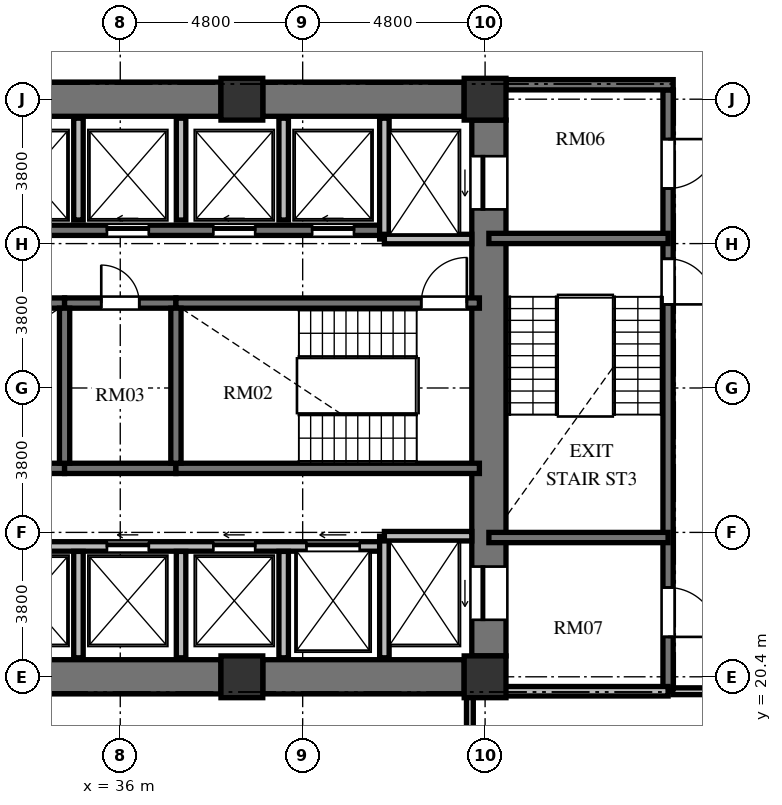
"""IFC4 building model, lengths in metres.
Left out: names, types, materials, properties, quantities, classifications, styles, units other than length and angle.
Written with IfcOpenShell. Run it as: python <this file> out.ifc"""

import sys

from ifc_helpers import new_model, si_unit, direction, frame, frame_2d, origin, origin_2d, place, context, subcontext, project, spatial, rectangle, extrude, element, fill, save


model = new_model("IFC4")
c1 = context("Model", 3, precision=1e-05, world=origin(), true_north=direction((0.0, 1.0)))
c2 = subcontext(c1, "Body", "Model", "MODEL_VIEW")
j1 = project(units=[si_unit("LENGTHUNIT", "METRE"), si_unit("PLANEANGLEUNIT", "RADIAN")], contexts=[c1])
p1 = place(None, origin())
s1 = spatial("IfcSite", under=j1, at=p1, CompositionType="ELEMENT")
p2 = place(p1, origin())
s2 = spatial("IfcBuilding", under=s1, at=p2, CompositionType="ELEMENT")
p3 = place(p2, frame((0.0, 0.0, 47.088)))
s3 = spatial("IfcBuildingStorey", under=s2, at=p3, CompositionType="ELEMENT", Elevation=47.088)
for number, where, z_axis, x_axis in (
    (1, (39.2, 20.4, 0.0), (0.0, 0.0, 1.0), (1.0, 0.0, 0.0)),
    (2, (45.6, 20.4, 0.0), (0.0, 0.0, 1.0), (1.0, 0.0, 0.0)),
    (3, (45.6, 35.6, 0.0), (0.0, 0.0, 1.0), (1.0, 0.0, 0.0)),
    (4, (39.2, 35.6, 0.0), (0.0, 0.0, 1.0), (1.0, 0.0, 0.0)),
):
    element("IfcColumn", number, at=place(p3, frame(where, z_axis=z_axis, x_axis=x_axis)), inside=s3, PredefinedType="COLUMN", context=c2, shape_type="SweptSolid", body=[
        extrude(rectangle(XDim=1.1, YDim=1.1, at=origin_2d()), origin(), (0.0, 0.0, 1.0), 3.648),
    ])
p4 = place(p3, frame((45.7, 20.95, 0.0), z_axis=(0.0, 0.0, 1.0), x_axis=(0.0, 1.0, 0.0)))
e5 = element("IfcWall", 5, at=p4, inside=s3, PredefinedType="SHEAR", context=c2, shape_type="SweptSolid", body=[
    extrude(rectangle(XDim=14.1, YDim=0.9, at=frame_2d((7.05, 0.0))), origin(), (0.0, 0.0, 1.0), 3.648),
])
p5 = place(p4, frame((11.75, 0.0, 0.0)))
e6 = element("IfcOpeningElement", 6, at=p5, cuts=e5, PredefinedType="OPENING", context=c2, shape_type="SweptSolid", body=[
    extrude(rectangle(XDim=1.4, YDim=2.3, at=frame_2d((0.7, 1.15))), frame((0.0, 0.46, 0.0), z_axis=(0.0, -1.0, 0.0), x_axis=(1.0, 0.0, 0.0)), (0.0, 0.0, 1.0), 0.92),
])
p6 = place(p4, frame((0.95, 0.0, 0.0)))
e7 = element("IfcOpeningElement", 7, at=p6, cuts=e5, PredefinedType="OPENING", context=c2, shape_type="SweptSolid", body=[
    extrude(rectangle(XDim=1.4, YDim=2.3, at=frame_2d((0.7, 1.15))), frame((0.0, 0.46, 0.0), z_axis=(0.0, -1.0, 0.0), x_axis=(1.0, 0.0, 0.0)), (0.0, 0.0, 1.0), 0.92),
])
for number, where, z_axis, x_axis in (
    (8, (33.35, 20.4, 0.0), (0.0, 0.0, 1.0), (1.0, 0.0, 0.0)),
    (9, (33.35, 35.6, 0.0), (0.0, 0.0, 1.0), (1.0, 0.0, 0.0)),
):
    element("IfcWall", number, at=place(p3, frame(where, z_axis=z_axis, x_axis=x_axis)), inside=s3, PredefinedType="SHEAR", context=c2, shape_type="SweptSolid", body=[
        extrude(rectangle(XDim=5.3, YDim=0.9, at=frame_2d((2.65, 0.0))), origin(), (0.0, 0.0, 1.0), 3.648),
    ])
for number, where, z_axis, x_axis in (
    (10, (39.75, 20.4, 0.0), (0.0, 0.0, 1.0), (1.0, 0.0, 0.0)),
    (11, (39.75, 35.6, 0.0), (0.0, 0.0, 1.0), (1.0, 0.0, 0.0)),
):
    element("IfcWall", number, at=place(p3, frame(where, z_axis=z_axis, x_axis=x_axis)), inside=s3, PredefinedType="SHEAR", context=c2, shape_type="SweptSolid", body=[
        extrude(rectangle(XDim=5.3, YDim=0.9, at=frame_2d((2.65, 0.0))), origin(), (0.0, 0.0, 1.0), 3.648),
    ])
p7 = place(p3, frame((26.55, 30.235, 0.0), z_axis=(0.0, 0.0, 1.0), x_axis=(1.0, 0.0, 0.0)))
e12 = element("IfcWall", 12, at=p7, inside=s3, PredefinedType="SHEAR", context=c2, shape_type="SweptSolid", body=[
    extrude(rectangle(XDim=7.985, YDim=0.27, at=frame_2d((3.992, 0.0))), origin(), (0.0, 0.0, 1.0), 3.648),
])
p8 = place(p3, frame((34.535, 30.235, 0.0), z_axis=(0.0, 0.0, 1.0), x_axis=(1.0, 0.0, 0.0)))
e13 = element("IfcWall", 13, at=p8, inside=s3, PredefinedType="SHEAR", context=c2, shape_type="SweptSolid", body=[
    extrude(rectangle(XDim=2.93, YDim=0.27, at=frame_2d((1.465, 0.0))), origin(), (0.0, 0.0, 1.0), 3.648),
])
p9 = place(p8, frame((0.965, 0.0, 0.0)))
e14 = element("IfcOpeningElement", 14, at=p9, cuts=e13, PredefinedType="OPENING", context=c2, shape_type="SweptSolid", body=[
    extrude(rectangle(XDim=1.0, YDim=2.1, at=frame_2d((0.5, 1.05))), frame((0.0, 0.145, 0.0), z_axis=(0.0, -1.0, 0.0), x_axis=(1.0, 0.0, 0.0)), (0.0, 0.0, 1.0), 0.29),
])
p10 = place(p3, frame((37.465, 30.235, 0.0), z_axis=(0.0, 0.0, 1.0), x_axis=(1.0, 0.0, 0.0)))
e15 = element("IfcWall", 15, at=p10, inside=s3, PredefinedType="SHEAR", context=c2, shape_type="SweptSolid", body=[
    extrude(rectangle(XDim=7.985, YDim=0.27, at=frame_2d((3.992, 0.0))), origin(), (0.0, 0.0, 1.0), 3.648),
])
p11 = place(p10, frame((6.455, 0.0, 0.0)))
e16 = element("IfcOpeningElement", 16, at=p11, cuts=e15, PredefinedType="OPENING", context=c2, shape_type="SweptSolid", body=[
    extrude(rectangle(XDim=1.2, YDim=2.15, at=frame_2d((0.6, 1.075))), frame((0.0, 0.145, 0.0), z_axis=(0.0, -1.0, 0.0), x_axis=(1.0, 0.0, 0.0)), (0.0, 0.0, 1.0), 0.29),
])
p12 = place(p3, frame((26.55, 25.885, 0.0), z_axis=(0.0, 0.0, 1.0), x_axis=(1.0, 0.0, 0.0)))
e17 = element("IfcWall", 17, at=p12, inside=s3, PredefinedType="SHEAR", context=c2, shape_type="SweptSolid", body=[
    extrude(rectangle(XDim=7.985, YDim=0.27, at=frame_2d((3.992, 0.0))), origin(), (0.0, 0.0, 1.0), 3.648),
])
p13 = place(p3, frame((34.535, 25.885, 0.0), z_axis=(0.0, 0.0, 1.0), x_axis=(1.0, 0.0, 0.0)))
e18 = element("IfcWall", 18, at=p13, inside=s3, PredefinedType="SHEAR", context=c2, shape_type="SweptSolid", body=[
    extrude(rectangle(XDim=2.93, YDim=0.27, at=frame_2d((1.465, 0.0))), origin(), (0.0, 0.0, 1.0), 3.648),
])
p14 = place(p3, frame((37.465, 25.885, 0.0), z_axis=(0.0, 0.0, 1.0), x_axis=(1.0, 0.0, 0.0)))
e19 = element("IfcWall", 19, at=p14, inside=s3, PredefinedType="SHEAR", context=c2, shape_type="SweptSolid", body=[
    extrude(rectangle(XDim=7.985, YDim=0.27, at=frame_2d((3.992, 0.0))), origin(), (0.0, 0.0, 1.0), 3.648),
])
for number, where, z_axis, x_axis in (
    (20, (34.535, 26.02, 0.0), (0.0, 0.0, 1.0), (0.0, 1.0, 0.0)),
    (21, (37.465, 26.02, 0.0), (0.0, 0.0, 1.0), (0.0, 1.0, 0.0)),
):
    element("IfcWall", number, at=place(p3, frame(where, z_axis=z_axis, x_axis=x_axis)), inside=s3, PredefinedType="SHEAR", context=c2, shape_type="SweptSolid", body=[
        extrude(rectangle(XDim=4.08, YDim=0.27, at=frame_2d((2.04, 0.0))), origin(), (0.0, 0.0, 1.0), 3.648),
    ])
p15 = place(p3, frame((26.55, 32.15, 0.0), z_axis=(0.0, 0.0, 1.0), x_axis=(1.0, 0.0, 0.0)))
e22 = element("IfcWall", 22, at=p15, inside=s3, PredefinedType="SHEAR", context=c2, shape_type="SweptSolid", body=[
    extrude(rectangle(XDim=16.4, YDim=0.27, at=frame_2d((8.2, 0.0))), origin(), (0.0, 0.0, 1.0), 3.648),
])
p16 = place(p15, frame((1.1, 0.0, 0.0)))
e23 = element("IfcOpeningElement", 23, at=p16, cuts=e22, PredefinedType="OPENING", context=c2, shape_type="SweptSolid", body=[
    extrude(rectangle(XDim=1.1, YDim=2.2, at=frame_2d((0.55, 1.1))), frame((0.0, 0.145, 0.0), z_axis=(0.0, -1.0, 0.0), x_axis=(1.0, 0.0, 0.0)), (0.0, 0.0, 1.0), 0.29),
])
p17 = place(p15, frame((3.7, 0.0, 0.0)))
e24 = element("IfcOpeningElement", 24, at=p17, cuts=e22, PredefinedType="OPENING", context=c2, shape_type="SweptSolid", body=[
    extrude(rectangle(XDim=1.1, YDim=2.2, at=frame_2d((0.55, 1.1))), frame((0.0, 0.145, 0.0), z_axis=(0.0, -1.0, 0.0), x_axis=(1.0, 0.0, 0.0)), (0.0, 0.0, 1.0), 0.29),
])
p18 = place(p15, frame((6.5, 0.0, 0.0)))
e25 = element("IfcOpeningElement", 25, at=p18, cuts=e22, PredefinedType="OPENING", context=c2, shape_type="SweptSolid", body=[
    extrude(rectangle(XDim=1.1, YDim=2.2, at=frame_2d((0.55, 1.1))), frame((0.0, 0.145, 0.0), z_axis=(0.0, -1.0, 0.0), x_axis=(1.0, 0.0, 0.0)), (0.0, 0.0, 1.0), 0.29),
])
p19 = place(p15, frame((9.1, 0.0, 0.0)))
e26 = element("IfcOpeningElement", 26, at=p19, cuts=e22, PredefinedType="OPENING", context=c2, shape_type="SweptSolid", body=[
    extrude(rectangle(XDim=1.1, YDim=2.2, at=frame_2d((0.55, 1.1))), frame((0.0, 0.145, 0.0), z_axis=(0.0, -1.0, 0.0), x_axis=(1.0, 0.0, 0.0)), (0.0, 0.0, 1.0), 0.29),
])
p20 = place(p15, frame((11.9, 0.0, 0.0)))
e27 = element("IfcOpeningElement", 27, at=p20, cuts=e22, PredefinedType="OPENING", context=c2, shape_type="SweptSolid", body=[
    extrude(rectangle(XDim=1.1, YDim=2.2, at=frame_2d((0.55, 1.1))), frame((0.0, 0.145, 0.0), z_axis=(0.0, -1.0, 0.0), x_axis=(1.0, 0.0, 0.0)), (0.0, 0.0, 1.0), 0.29),
])
p21 = place(p15, frame((14.5, 0.0, 0.0)))
e28 = element("IfcOpeningElement", 28, at=p21, cuts=e22, PredefinedType="OPENING", context=c2, shape_type="SweptSolid", body=[
    extrude(rectangle(XDim=1.1, YDim=2.2, at=frame_2d((0.55, 1.1))), frame((0.0, 0.145, 0.0), z_axis=(0.0, -1.0, 0.0), x_axis=(1.0, 0.0, 0.0)), (0.0, 0.0, 1.0), 0.29),
])
p22 = place(p3, frame((26.75, 23.83, 0.0), z_axis=(0.0, 0.0, 1.0), x_axis=(1.0, 0.0, 0.0)))
e29 = element("IfcWall", 29, at=p22, inside=s3, PredefinedType="SOLIDWALL", context=c2, shape_type="SweptSolid", body=[
    extrude(rectangle(XDim=16.2, YDim=0.25, at=frame_2d((8.1, 0.0))), origin(), (0.0, 0.0, 1.0), 3.428),
])
p23 = place(p22, frame((0.9, 0.0, 0.0)))
e30 = element("IfcOpeningElement", 30, at=p23, cuts=e29, PredefinedType="OPENING", context=c2, shape_type="SweptSolid", body=[
    extrude(rectangle(XDim=1.1, YDim=2.2, at=frame_2d((0.55, 1.1))), frame((0.0, 0.135, 0.0), z_axis=(0.0, -1.0, 0.0), x_axis=(1.0, 0.0, 0.0)), (0.0, 0.0, 1.0), 0.27),
])
p24 = place(p22, frame((3.5, 0.0, 0.0)))
e31 = element("IfcOpeningElement", 31, at=p24, cuts=e29, PredefinedType="OPENING", context=c2, shape_type="SweptSolid", body=[
    extrude(rectangle(XDim=1.1, YDim=2.2, at=frame_2d((0.55, 1.1))), frame((0.0, 0.135, 0.0), z_axis=(0.0, -1.0, 0.0), x_axis=(1.0, 0.0, 0.0)), (0.0, 0.0, 1.0), 0.27),
])
p25 = place(p22, frame((6.3, 0.0, 0.0)))
e32 = element("IfcOpeningElement", 32, at=p25, cuts=e29, PredefinedType="OPENING", context=c2, shape_type="SweptSolid", body=[
    extrude(rectangle(XDim=1.1, YDim=2.2, at=frame_2d((0.55, 1.1))), frame((0.0, 0.135, 0.0), z_axis=(0.0, -1.0, 0.0), x_axis=(1.0, 0.0, 0.0)), (0.0, 0.0, 1.0), 0.27),
])
p26 = place(p22, frame((8.9, 0.0, 0.0)))
e33 = element("IfcOpeningElement", 33, at=p26, cuts=e29, PredefinedType="OPENING", context=c2, shape_type="SweptSolid", body=[
    extrude(rectangle(XDim=1.1, YDim=2.2, at=frame_2d((0.55, 1.1))), frame((0.0, 0.135, 0.0), z_axis=(0.0, -1.0, 0.0), x_axis=(1.0, 0.0, 0.0)), (0.0, 0.0, 1.0), 0.27),
])
p27 = place(p22, frame((11.7, 0.0, 0.0)))
e34 = element("IfcOpeningElement", 34, at=p27, cuts=e29, PredefinedType="OPENING", context=c2, shape_type="SweptSolid", body=[
    extrude(rectangle(XDim=1.1, YDim=2.2, at=frame_2d((0.55, 1.1))), frame((0.0, 0.135, 0.0), z_axis=(0.0, -1.0, 0.0), x_axis=(1.0, 0.0, 0.0)), (0.0, 0.0, 1.0), 0.27),
])
p28 = place(p22, frame((14.15, 0.0, 0.0)))
e35 = element("IfcOpeningElement", 35, at=p28, cuts=e29, PredefinedType="OPENING", context=c2, shape_type="SweptSolid", body=[
    extrude(rectangle(XDim=1.4, YDim=2.3, at=frame_2d((0.7, 1.15))), frame((0.0, 0.135, 0.0), z_axis=(0.0, -1.0, 0.0), x_axis=(1.0, 0.0, 0.0)), (0.0, 0.0, 1.0), 0.27),
])
p29 = place(p3, frame((42.95, 31.92, 0.0), z_axis=(0.0, 0.0, 1.0), x_axis=(0.0, 1.0, 0.0)))
e36 = element("IfcWall", 36, at=p29, inside=s3, PredefinedType="SOLIDWALL", context=c2, shape_type="SweptSolid", body=[
    extrude(rectangle(XDim=3.18, YDim=0.25, at=frame_2d((1.59, 0.0))), origin(), (0.0, 0.0, 1.0), 3.428),
])
p30 = place(p3, frame((42.95, 31.92, 0.0), z_axis=(0.0, 0.0, 1.0), x_axis=(1.0, 0.0, 0.0)))
e37 = element("IfcWall", 37, at=p30, inside=s3, PredefinedType="SOLIDWALL", context=c2, shape_type="SweptSolid", body=[
    extrude(rectangle(XDim=2.3, YDim=0.25, at=frame_2d((1.15, 0.0))), origin(), (0.0, 0.0, 1.0), 3.428),
])
p31 = place(p3, frame((42.95, 20.9, 0.0), z_axis=(0.0, 0.0, 1.0), x_axis=(0.0, 1.0, 0.0)))
e38 = element("IfcWall", 38, at=p31, inside=s3, PredefinedType="SOLIDWALL", context=c2, shape_type="SweptSolid", body=[
    extrude(rectangle(XDim=3.2, YDim=0.25, at=frame_2d((1.6, 0.0))), origin(), (0.0, 0.0, 1.0), 3.428),
])
p32 = place(p3, frame((42.95, 24.1, 0.0), z_axis=(0.0, 0.0, 1.0), x_axis=(1.0, 0.0, 0.0)))
e39 = element("IfcWall", 39, at=p32, inside=s3, PredefinedType="SOLIDWALL", context=c2, shape_type="SweptSolid", body=[
    extrude(rectangle(XDim=2.3, YDim=0.25, at=frame_2d((1.15, 0.0))), origin(), (0.0, 0.0, 1.0), 3.428),
])
p33 = place(p3, frame((34.9, 32.42, 0.0), z_axis=(0.0, 0.0, 1.0), x_axis=(0.0, 1.0, 0.0)))
e40 = element("IfcWall", 40, at=p33, inside=s3, PredefinedType="SOLIDWALL", context=c2, shape_type="SweptSolid", body=[
    extrude(rectangle(XDim=2.68, YDim=0.25, at=frame_2d((1.34, 0.0))), origin(), (0.0, 0.0, 1.0), 3.428),
])
p34 = place(p3, frame((34.9, 20.9, 0.0), z_axis=(0.0, 0.0, 1.0), x_axis=(0.0, 1.0, 0.0)))
e41 = element("IfcWall", 41, at=p34, inside=s3, PredefinedType="SOLIDWALL", context=c2, shape_type="SweptSolid", body=[
    extrude(rectangle(XDim=2.8, YDim=0.25, at=frame_2d((1.4, 0.0))), origin(), (0.0, 0.0, 1.0), 3.428),
])
p35 = place(p3, frame((37.6, 32.42, 0.0), z_axis=(0.0, 0.0, 1.0), x_axis=(0.0, 1.0, 0.0)))
e42 = element("IfcWall", 42, at=p35, inside=s3, PredefinedType="SOLIDWALL", context=c2, shape_type="SweptSolid", body=[
    extrude(rectangle(XDim=2.68, YDim=0.25, at=frame_2d((1.34, 0.0))), origin(), (0.0, 0.0, 1.0), 3.428),
])
p36 = place(p3, frame((37.6, 20.9, 0.0), z_axis=(0.0, 0.0, 1.0), x_axis=(0.0, 1.0, 0.0)))
e43 = element("IfcWall", 43, at=p36, inside=s3, PredefinedType="SOLIDWALL", context=c2, shape_type="SweptSolid", body=[
    extrude(rectangle(XDim=2.8, YDim=0.25, at=frame_2d((1.4, 0.0))), origin(), (0.0, 0.0, 1.0), 3.428),
])
p37 = place(p3, frame((40.3, 32.42, 0.0), z_axis=(0.0, 0.0, 1.0), x_axis=(0.0, 1.0, 0.0)))
e44 = element("IfcWall", 44, at=p37, inside=s3, PredefinedType="SOLIDWALL", context=c2, shape_type="SweptSolid", body=[
    extrude(rectangle(XDim=2.68, YDim=0.25, at=frame_2d((1.34, 0.0))), origin(), (0.0, 0.0, 1.0), 3.428),
])
p38 = place(p3, frame((40.3, 20.9, 0.0), z_axis=(0.0, 0.0, 1.0), x_axis=(0.0, 1.0, 0.0)))
e45 = element("IfcWall", 45, at=p38, inside=s3, PredefinedType="SOLIDWALL", context=c2, shape_type="SweptSolid", body=[
    extrude(rectangle(XDim=2.8, YDim=0.25, at=frame_2d((1.4, 0.0))), origin(), (0.0, 0.0, 1.0), 3.428),
])
p39 = place(p3, frame((50.415, 35.845, 0.0), z_axis=(0.0, 0.0, 1.0), x_axis=(0.0, -1.0, 0.0)))
e46 = element("IfcWall", 46, at=p39, inside=s3, PredefinedType="SHEAR", context=c2, shape_type="SweptSolid", body=[
    extrude(rectangle(XDim=15.825, YDim=0.27, at=frame_2d((7.913, 0.0))), origin(), (0.0, 0.0, 1.0), 3.648),
])
p40 = place(p39, frame((4.445, 0.0, 0.0)))
e47 = element("IfcOpeningElement", 47, at=p40, cuts=e46, PredefinedType="OPENING", context=c2, shape_type="SweptSolid", body=[
    extrude(rectangle(XDim=1.2, YDim=2.15, at=frame_2d((0.6, 1.075))), frame((0.0, 0.145, 0.0), z_axis=(0.0, -1.0, 0.0), x_axis=(1.0, 0.0, 0.0)), (0.0, 0.0, 1.0), 0.29),
])
p41 = place(p39, frame((1.295, 0.0, 0.0)))
e48 = element("IfcOpeningElement", 48, at=p41, cuts=e46, PredefinedType="OPENING", context=c2, shape_type="SweptSolid", body=[
    extrude(rectangle(XDim=1.3, YDim=2.2, at=frame_2d((0.65, 1.1))), frame((0.0, 0.145, 0.0), z_axis=(0.0, -1.0, 0.0), x_axis=(1.0, 0.0, 0.0)), (0.0, 0.0, 1.0), 0.29),
])
p42 = place(p39, frame((13.095, 0.0, 0.0)))
e49 = element("IfcOpeningElement", 49, at=p42, cuts=e46, PredefinedType="OPENING", context=c2, shape_type="SweptSolid", body=[
    extrude(rectangle(XDim=1.3, YDim=2.2, at=frame_2d((0.65, 1.1))), frame((0.0, 0.145, 0.0), z_axis=(0.0, -1.0, 0.0), x_axis=(1.0, 0.0, 0.0)), (0.0, 0.0, 1.0), 0.29),
])
p43 = place(p3, frame((46.15, 35.98, 0.0), z_axis=(0.0, 0.0, 1.0), x_axis=(1.0, 0.0, 0.0)))
e50 = element("IfcWall", 50, at=p43, inside=s3, PredefinedType="SHEAR", context=c2, shape_type="SweptSolid", body=[
    extrude(rectangle(XDim=4.4, YDim=0.27, at=frame_2d((2.2, 0.0))), origin(), (0.0, 0.0, 1.0), 3.648),
])
for number, where, z_axis, x_axis in (
    (51, (45.7, 31.935, 0.0), (0.0, 0.0, 1.0), (1.0, 0.0, 0.0)),
    (52, (45.7, 24.065, 0.0), (0.0, 0.0, 1.0), (1.0, 0.0, 0.0)),
):
    element("IfcWall", number, at=place(p3, frame(where, z_axis=z_axis, x_axis=x_axis)), inside=s3, PredefinedType="SHEAR", context=c2, shape_type="SweptSolid", body=[
        extrude(rectangle(XDim=4.715, YDim=0.27, at=frame_2d((2.357, 0.0))), origin(), (0.0, 0.0, 1.0), 3.648),
    ])
p44 = place(p3, frame((45.7, 20.02, 0.0), z_axis=(0.0, 0.0, 1.0), x_axis=(1.0, 0.0, 0.0)))
e53 = element("IfcWall", 53, at=p44, inside=s3, PredefinedType="SOLIDWALL", context=c2, shape_type="SweptSolid", body=[
    extrude(rectangle(XDim=4.715, YDim=0.25, at=frame_2d((2.357, 0.0))), origin(), (0.0, 0.0, 1.0), 2.813),
])
p45 = place(p3, frame((53.19, 20.02, 0.0), z_axis=(0.0, 0.0, 1.0), x_axis=(-1.0, 0.0, 0.0)))
e54 = element("IfcWall", 54, at=p45, inside=s3, PredefinedType="PARTITIONING", context=c2, shape_type="SweptSolid", body=[
    extrude(rectangle(XDim=2.65, YDim=0.18, at=frame_2d((1.325, 0.0))), origin(), (0.0, 0.0, 1.0), 2.813),
])
p46 = place(p3, frame((45.2, 19.91, 0.0), z_axis=(0.0, 0.0, 1.0), x_axis=(0.0, -1.0, 0.0)))
e55 = element("IfcWall", 55, at=p46, inside=s3, PredefinedType="PARTITIONING", context=c2, shape_type="SweptSolid", body=[
    extrude(rectangle(XDim=2.55, YDim=0.18, at=frame_2d((1.275, 0.0))), origin(), (0.0, 0.0, 1.0), 3.428),
])
p47 = place(p11, origin())
e56 = element("IfcDoor", 56, at=p47, inside=s3, OperationType="SINGLE_SWING_RIGHT", PredefinedType="DOOR", context=c2, shape_type="SweptSolid", body=[
    extrude(rectangle(XDim=1.2, YDim=2.15, at=frame_2d((0.6, 1.075))), frame((0.0, 0.025, 0.0), z_axis=(0.0, -1.0, 0.0), x_axis=(1.0, 0.0, 0.0)), (0.0, 0.0, 1.0), 0.05),
])
fill(e16, e56)
p48 = place(p9, origin())
e57 = element("IfcDoor", 57, at=p48, inside=s3, OperationType="SINGLE_SWING_LEFT", PredefinedType="DOOR", context=c2, shape_type="SweptSolid", body=[
    extrude(rectangle(XDim=1.0, YDim=2.1, at=frame_2d((0.5, 1.05))), frame((0.0, 0.025, 0.0), z_axis=(0.0, -1.0, 0.0), x_axis=(1.0, 0.0, 0.0)), (0.0, 0.0, 1.0), 0.05),
])
fill(e14, e57)
p49 = place(p19, origin())
e58 = element("IfcDoor", 58, at=p49, inside=s3, OperationType="SLIDING_TO_LEFT", PredefinedType="DOOR", context=c2, shape_type="SweptSolid", body=[
    extrude(rectangle(XDim=1.1, YDim=2.2, at=frame_2d((0.55, 1.1))), frame((0.0, 0.025, 0.0), z_axis=(0.0, -1.0, 0.0), x_axis=(1.0, 0.0, 0.0)), (0.0, 0.0, 1.0), 0.05),
])
fill(e26, e58)
p50 = place(p26, origin())
e59 = element("IfcDoor", 59, at=p50, inside=s3, OperationType="SLIDING_TO_LEFT", PredefinedType="DOOR", context=c2, shape_type="SweptSolid", body=[
    extrude(rectangle(XDim=1.1, YDim=2.2, at=frame_2d((0.55, 1.1))), frame((0.0, 0.025, 0.0), z_axis=(0.0, -1.0, 0.0), x_axis=(1.0, 0.0, 0.0)), (0.0, 0.0, 1.0), 0.05),
])
fill(e33, e59)
p51 = place(p20, origin())
e60 = element("IfcDoor", 60, at=p51, inside=s3, OperationType="SLIDING_TO_LEFT", PredefinedType="DOOR", context=c2, shape_type="SweptSolid", body=[
    extrude(rectangle(XDim=1.1, YDim=2.2, at=frame_2d((0.55, 1.1))), frame((0.0, 0.025, 0.0), z_axis=(0.0, -1.0, 0.0), x_axis=(1.0, 0.0, 0.0)), (0.0, 0.0, 1.0), 0.05),
])
fill(e27, e60)
p52 = place(p21, origin())
e61 = element("IfcDoor", 61, at=p52, inside=s3, OperationType="SLIDING_TO_LEFT", PredefinedType="DOOR", context=c2, shape_type="SweptSolid", body=[
    extrude(rectangle(XDim=1.1, YDim=2.2, at=frame_2d((0.55, 1.1))), frame((0.0, 0.025, 0.0), z_axis=(0.0, -1.0, 0.0), x_axis=(1.0, 0.0, 0.0)), (0.0, 0.0, 1.0), 0.05),
])
fill(e28, e61)
p53 = place(p27, origin())
e62 = element("IfcDoor", 62, at=p53, inside=s3, OperationType="SLIDING_TO_LEFT", PredefinedType="DOOR", context=c2, shape_type="SweptSolid", body=[
    extrude(rectangle(XDim=1.1, YDim=2.2, at=frame_2d((0.55, 1.1))), frame((0.0, 0.025, 0.0), z_axis=(0.0, -1.0, 0.0), x_axis=(1.0, 0.0, 0.0)), (0.0, 0.0, 1.0), 0.05),
])
fill(e34, e62)
p54 = place(p5, origin())
e63 = element("IfcDoor", 63, at=p54, inside=s3, OperationType="SLIDING_TO_LEFT", PredefinedType="DOOR", context=c2, shape_type="SweptSolid", body=[
    extrude(rectangle(XDim=1.4, YDim=2.3, at=frame_2d((0.7, 1.15))), frame((0.0, 0.025, 0.0), z_axis=(0.0, -1.0, 0.0), x_axis=(1.0, 0.0, 0.0)), (0.0, 0.0, 1.0), 0.05),
])
fill(e6, e63)
p55 = place(p6, origin())
e64 = element("IfcDoor", 64, at=p55, inside=s3, OperationType="SLIDING_TO_LEFT", PredefinedType="DOOR", context=c2, shape_type="SweptSolid", body=[
    extrude(rectangle(XDim=1.4, YDim=2.3, at=frame_2d((0.7, 1.15))), frame((0.0, 0.025, 0.0), z_axis=(0.0, -1.0, 0.0), x_axis=(1.0, 0.0, 0.0)), (0.0, 0.0, 1.0), 0.05),
])
fill(e7, e64)
p56 = place(p28, origin())
e65 = element("IfcDoor", 65, at=p56, inside=s3, OperationType="SLIDING_TO_LEFT", PredefinedType="DOOR", context=c2, shape_type="SweptSolid", body=[
    extrude(rectangle(XDim=1.4, YDim=2.3, at=frame_2d((0.7, 1.15))), frame((0.0, 0.025, 0.0), z_axis=(0.0, -1.0, 0.0), x_axis=(1.0, 0.0, 0.0)), (0.0, 0.0, 1.0), 0.05),
])
fill(e35, e65)
p57 = place(p40, origin())
e66 = element("IfcDoor", 66, at=p57, inside=s3, OperationType="SINGLE_SWING_RIGHT", PredefinedType="DOOR", context=c2, shape_type="SweptSolid", body=[
    extrude(rectangle(XDim=1.2, YDim=2.15, at=frame_2d((0.6, 1.075))), frame((0.0, 0.025, 0.0), z_axis=(0.0, -1.0, 0.0), x_axis=(1.0, 0.0, 0.0)), (0.0, 0.0, 1.0), 0.05),
])
fill(e47, e66)
p58 = place(p41, origin())
e67 = element("IfcDoor", 67, at=p58, inside=s3, OperationType="SINGLE_SWING_LEFT", PredefinedType="DOOR", context=c2, shape_type="SweptSolid", body=[
    extrude(rectangle(XDim=1.3, YDim=2.2, at=frame_2d((0.65, 1.1))), frame((0.0, 0.025, 0.0), z_axis=(0.0, -1.0, 0.0), x_axis=(1.0, 0.0, 0.0)), (0.0, 0.0, 1.0), 0.05),
])
fill(e48, e67)
p59 = place(p42, origin())
e68 = element("IfcDoor", 68, at=p59, inside=s3, OperationType="SINGLE_SWING_RIGHT", PredefinedType="DOOR", context=c2, shape_type="SweptSolid", body=[
    extrude(rectangle(XDim=1.3, YDim=2.2, at=frame_2d((0.65, 1.1))), frame((0.0, 0.025, 0.0), z_axis=(0.0, -1.0, 0.0), x_axis=(1.0, 0.0, 0.0)), (0.0, 0.0, 1.0), 0.05),
])
fill(e49, e68)
save(model, sys.argv[1])
